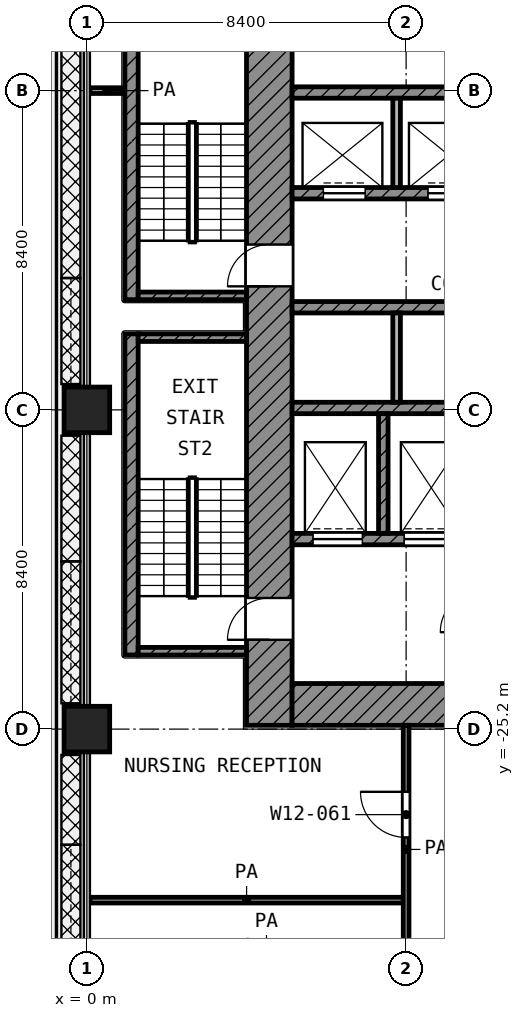
"""IFC4 building model, lengths in metres.
Left out: names, types, materials, properties, quantities, classifications, styles, units other than length and angle.
Written with IfcOpenShell. Run it as: python <this file> out.ifc"""

import sys

from ifc_helpers import new_model, si_unit, direction, frame, frame_2d, origin, origin_2d, place, context, subcontext, project, spatial, rectangle, extrude, element, fill, save


model = new_model("IFC4")
c1 = context("Model", 3, precision=1e-05, world=origin(), true_north=direction((0.0, 1.0)))
c2 = subcontext(c1, "Body", "Model", "MODEL_VIEW")
j1 = project(units=[si_unit("LENGTHUNIT", "METRE"), si_unit("PLANEANGLEUNIT", "RADIAN")], contexts=[c1])
p1 = place(None, origin())
s1 = spatial("IfcSite", under=j1, at=p1, CompositionType="ELEMENT")
p2 = place(p1, origin())
s2 = spatial("IfcBuilding", under=s1, at=p2, CompositionType="ELEMENT")
p3 = place(p2, frame((0.0, 0.0, 56.0)))
s3 = spatial("IfcBuildingStorey", under=s2, at=p3, CompositionType="ELEMENT", Elevation=56.0)
for number, where, z_axis, x_axis in (
    (1, (0.0, -16.8, 0.0), (0.0, 0.0, 1.0), (1.0, 0.0, 0.0)),
    (2, (0.0, -25.2, 0.0), (0.0, 0.0, 1.0), (1.0, 0.0, 0.0)),
):
    element("IfcColumn", number, at=place(p3, frame(where, z_axis=z_axis, x_axis=x_axis)), inside=s3, PredefinedType="COLUMN", context=c2, shape_type="SweptSolid", body=[
        extrude(rectangle(XDim=1.2, YDim=1.2, at=origin_2d()), origin(), (0.0, 0.0, 1.0), 4.2),
    ])
p4 = place(p3, frame((4.8, -25.1, 0.0), z_axis=(0.0, 0.0, 1.0), x_axis=(0.0, 1.0, 0.0)))
e3 = element("IfcWall", 3, at=p4, inside=s3, PredefinedType="SHEAR", context=c2, shape_type="SweptSolid", body=[
    extrude(rectangle(XDim=19.7, YDim=1.2, at=frame_2d((9.85, 0.0))), origin(), (0.0, 0.0, 1.0), 3.9),
])
p5 = place(p4, frame((11.55, 0.0, 0.0)))
e4 = element("IfcOpeningElement", 4, at=p5, cuts=e3, PredefinedType="OPENING", context=c2, shape_type="SweptSolid", body=[
    extrude(rectangle(XDim=1.1, YDim=2.1, at=frame_2d((0.55, 1.05))), frame((0.0, 0.61, 0.0), z_axis=(0.0, -1.0, 0.0), x_axis=(1.0, 0.0, 0.0)), (0.0, 0.0, 1.0), 1.22),
])
p6 = place(p4, frame((2.25, 0.0, 0.0)))
e5 = element("IfcOpeningElement", 5, at=p6, cuts=e3, PredefinedType="OPENING", context=c2, shape_type="SweptSolid", body=[
    extrude(rectangle(XDim=1.1, YDim=2.1, at=frame_2d((0.55, 1.05))), frame((0.0, 0.61, 0.0), z_axis=(0.0, -1.0, 0.0), x_axis=(1.0, 0.0, 0.0)), (0.0, 0.0, 1.0), 1.22),
])
p7 = place(p3, frame((5.4, -24.55, 0.0), z_axis=(0.0, 0.0, 1.0), x_axis=(1.0, 0.0, 0.0)))
e6 = element("IfcWall", 6, at=p7, inside=s3, PredefinedType="SHEAR", context=c2, shape_type="SweptSolid", body=[
    extrude(rectangle(XDim=18.6, YDim=1.1, at=frame_2d((9.3, 0.0))), origin(), (0.0, 0.0, 1.0), 3.9),
])
p8 = place(p7, frame((6.3, 0.0, 0.0)))
e7 = element("IfcOpeningElement", 7, at=p8, cuts=e6, PredefinedType="OPENING", context=c2, shape_type="SweptSolid", body=[
    extrude(rectangle(XDim=1.8, YDim=2.1, at=frame_2d((0.9, 1.05))), frame((0.0, 0.56, 0.0), z_axis=(0.0, -1.0, 0.0), x_axis=(1.0, 0.0, 0.0)), (0.0, 0.0, 1.0), 1.12),
])
p9 = place(p3, frame((5.4, -8.45, 0.0), z_axis=(0.0, 0.0, 1.0), x_axis=(1.0, 0.0, 0.0)))
e8 = element("IfcWall", 8, at=p9, inside=s3, PredefinedType="SHEAR", context=c2, shape_type="SweptSolid", body=[
    extrude(rectangle(XDim=16.65, YDim=0.3, at=frame_2d((8.325, 0.0))), origin(), (0.0, 0.0, 1.0), 3.9),
])
p10 = place(p3, frame((5.4, -11.1, 0.0), z_axis=(0.0, 0.0, 1.0), x_axis=(1.0, 0.0, 0.0)))
e9 = element("IfcWall", 9, at=p10, inside=s3, PredefinedType="SHEAR", context=c2, shape_type="SweptSolid", body=[
    extrude(rectangle(XDim=16.65, YDim=0.3, at=frame_2d((8.325, 0.0))), origin(), (0.0, 0.0, 1.0), 3.9),
])
p11 = place(p10, frame((0.825, 0.0, 0.0)))
e10 = element("IfcOpeningElement", 10, at=p11, cuts=e9, PredefinedType="OPENING", context=c2, shape_type="SweptSolid", body=[
    extrude(rectangle(XDim=1.1, YDim=2.1, at=frame_2d((0.55, 1.05))), frame((0.0, 0.16, 0.0), z_axis=(0.0, -1.0, 0.0), x_axis=(1.0, 0.0, 0.0)), (0.0, 0.0, 1.0), 0.32),
])
p12 = place(p10, frame((3.575, 0.0, 0.0)))
e11 = element("IfcOpeningElement", 11, at=p12, cuts=e9, PredefinedType="OPENING", context=c2, shape_type="SweptSolid", body=[
    extrude(rectangle(XDim=1.1, YDim=2.1, at=frame_2d((0.55, 1.05))), frame((0.0, 0.16, 0.0), z_axis=(0.0, -1.0, 0.0), x_axis=(1.0, 0.0, 0.0)), (0.0, 0.0, 1.0), 0.32),
])
p13 = place(p10, frame((6.325, 0.0, 0.0)))
e12 = element("IfcOpeningElement", 12, at=p13, cuts=e9, PredefinedType="OPENING", context=c2, shape_type="SweptSolid", body=[
    extrude(rectangle(XDim=1.1, YDim=2.1, at=frame_2d((0.55, 1.05))), frame((0.0, 0.16, 0.0), z_axis=(0.0, -1.0, 0.0), x_axis=(1.0, 0.0, 0.0)), (0.0, 0.0, 1.0), 0.32),
])
p14 = place(p10, frame((9.075, 0.0, 0.0)))
e13 = element("IfcOpeningElement", 13, at=p14, cuts=e9, PredefinedType="OPENING", context=c2, shape_type="SweptSolid", body=[
    extrude(rectangle(XDim=1.1, YDim=2.1, at=frame_2d((0.55, 1.05))), frame((0.0, 0.16, 0.0), z_axis=(0.0, -1.0, 0.0), x_axis=(1.0, 0.0, 0.0)), (0.0, 0.0, 1.0), 0.32),
])
for number, where, z_axis, x_axis in (
    (14, (5.4, -14.1, 0.0), (0.0, 0.0, 1.0), (1.0, 0.0, 0.0)),
    (15, (5.4, -16.75, 0.0), (0.0, 0.0, 1.0), (1.0, 0.0, 0.0)),
):
    element("IfcWall", number, at=place(p3, frame(where, z_axis=z_axis, x_axis=x_axis)), inside=s3, PredefinedType="SHEAR", context=c2, shape_type="SweptSolid", body=[
        extrude(rectangle(XDim=16.65, YDim=0.3, at=frame_2d((8.325, 0.0))), origin(), (0.0, 0.0, 1.0), 3.9),
    ])
p15 = place(p3, frame((5.4, -20.2, 0.0), z_axis=(0.0, 0.0, 1.0), x_axis=(1.0, 0.0, 0.0)))
e16 = element("IfcWall", 16, at=p15, inside=s3, PredefinedType="SHEAR", context=c2, shape_type="SweptSolid", body=[
    extrude(rectangle(XDim=14.65, YDim=0.3, at=frame_2d((7.325, 0.0))), origin(), (0.0, 0.0, 1.0), 3.9),
])
p16 = place(p15, frame((10.55, 0.0, 0.0)))
e17 = element("IfcOpeningElement", 17, at=p16, cuts=e16, PredefinedType="OPENING", context=c2, shape_type="SweptSolid", body=[
    extrude(rectangle(XDim=1.3, YDim=2.1, at=frame_2d((0.65, 1.05))), frame((0.0, 0.16, 0.0), z_axis=(0.0, -1.0, 0.0), x_axis=(1.0, 0.0, 0.0)), (0.0, 0.0, 1.0), 0.32),
])
p17 = place(p15, frame((12.95, 0.0, 0.0)))
e18 = element("IfcOpeningElement", 18, at=p17, cuts=e16, PredefinedType="OPENING", context=c2, shape_type="SweptSolid", body=[
    extrude(rectangle(XDim=1.3, YDim=2.1, at=frame_2d((0.65, 1.05))), frame((0.0, 0.16, 0.0), z_axis=(0.0, -1.0, 0.0), x_axis=(1.0, 0.0, 0.0)), (0.0, 0.0, 1.0), 0.32),
])
p18 = place(p15, frame((0.55, 0.0, 0.0)))
e19 = element("IfcOpeningElement", 19, at=p18, cuts=e16, PredefinedType="OPENING", context=c2, shape_type="SweptSolid", body=[
    extrude(rectangle(XDim=1.3, YDim=2.1, at=frame_2d((0.65, 1.05))), frame((0.0, 0.16, 0.0), z_axis=(0.0, -1.0, 0.0), x_axis=(1.0, 0.0, 0.0)), (0.0, 0.0, 1.0), 0.32),
])
p19 = place(p15, frame((2.95, 0.0, 0.0)))
e20 = element("IfcOpeningElement", 20, at=p19, cuts=e16, PredefinedType="OPENING", context=c2, shape_type="SweptSolid", body=[
    extrude(rectangle(XDim=1.3, YDim=2.1, at=frame_2d((0.65, 1.05))), frame((0.0, 0.16, 0.0), z_axis=(0.0, -1.0, 0.0), x_axis=(1.0, 0.0, 0.0)), (0.0, 0.0, 1.0), 0.32),
])
p20 = place(p15, frame((7.15, 0.0, 0.0)))
e21 = element("IfcOpeningElement", 21, at=p20, cuts=e16, PredefinedType="OPENING", context=c2, shape_type="SweptSolid", body=[
    extrude(rectangle(XDim=0.9, YDim=2.1, at=frame_2d((0.45, 1.05))), frame((0.0, 0.16, 0.0), z_axis=(0.0, -1.0, 0.0), x_axis=(1.0, 0.0, 0.0)), (0.0, 0.0, 1.0), 0.32),
])
p21 = place(p3, frame((7.8, -20.05, 0.0), z_axis=(0.0, 0.0, 1.0), x_axis=(0.0, 1.0, 0.0)))
e22 = element("IfcWall", 22, at=p21, inside=s3, PredefinedType="SHEAR", context=c2, shape_type="SweptSolid", body=[
    extrude(rectangle(XDim=3.15, YDim=0.25, at=frame_2d((1.575, 0.0))), origin(), (0.0, 0.0, 1.0), 3.9),
])
p22 = place(p3, frame((8.15, -10.95, 0.0), z_axis=(0.0, 0.0, 1.0), x_axis=(0.0, 1.0, 0.0)))
e23 = element("IfcWall", 23, at=p22, inside=s3, PredefinedType="PARTITIONING", context=c2, shape_type="SweptSolid", body=[
    extrude(rectangle(XDim=2.35, YDim=0.2, at=frame_2d((1.175, 0.0))), origin(), (0.0, 0.0, 1.0), 3.9),
])
p23 = place(p3, frame((8.15, -16.6, 0.0), z_axis=(0.0, 0.0, 1.0), x_axis=(0.0, 1.0, 0.0)))
e24 = element("IfcWall", 24, at=p23, inside=s3, PredefinedType="PARTITIONING", context=c2, shape_type="SweptSolid", body=[
    extrude(rectangle(XDim=2.35, YDim=0.2, at=frame_2d((1.175, 0.0))), origin(), (0.0, 0.0, 1.0), 3.9),
])
p24 = place(p3, frame((1.175, -13.9, 0.0), z_axis=(0.0, 0.0, 1.0), x_axis=(0.0, 1.0, 0.0)))
e25 = element("IfcWall", 25, at=p24, inside=s3, PredefinedType="SHEAR", context=c2, shape_type="SweptSolid", body=[
    extrude(rectangle(XDim=8.45, YDim=0.35, at=frame_2d((4.225, 0.0))), origin(), (0.0, 0.0, 1.0), 3.9),
])
p25 = place(p3, frame((1.35, -13.8, 0.0), z_axis=(0.0, 0.0, 1.0), x_axis=(1.0, 0.0, 0.0)))
e26 = element("IfcWall", 26, at=p25, inside=s3, PredefinedType="SHEAR", context=c2, shape_type="SweptSolid", body=[
    extrude(rectangle(XDim=2.85, YDim=0.2, at=frame_2d((1.425, 0.0))), origin(), (0.0, 0.0, 1.0), 3.9),
])
p26 = place(p3, frame((1.175, -23.25, 0.0), z_axis=(0.0, 0.0, 1.0), x_axis=(0.0, 1.0, 0.0)))
e27 = element("IfcWall", 27, at=p26, inside=s3, PredefinedType="SHEAR", context=c2, shape_type="SweptSolid", body=[
    extrude(rectangle(XDim=8.45, YDim=0.35, at=frame_2d((4.225, 0.0))), origin(), (0.0, 0.0, 1.0), 3.9),
])
for number, where, z_axis, x_axis in (
    (28, (1.35, -14.9, 0.0), (0.0, 0.0, 1.0), (1.0, 0.0, 0.0)),
    (29, (1.35, -23.15, 0.0), (0.0, 0.0, 1.0), (1.0, 0.0, 0.0)),
):
    element("IfcWall", number, at=place(p3, frame(where, z_axis=z_axis, x_axis=x_axis)), inside=s3, PredefinedType="SHEAR", context=c2, shape_type="SweptSolid", body=[
        extrude(rectangle(XDim=2.85, YDim=0.2, at=frame_2d((1.425, 0.0))), origin(), (0.0, 0.0, 1.0), 3.9),
    ])
p27 = place(p3, frame((0.08, -29.7, 0.0), z_axis=(0.0, 0.0, 1.0), x_axis=(1.0, 0.0, 0.0)))
e30 = element("IfcWall", 30, at=p27, inside=s3, PredefinedType="PARTITIONING", context=c2, shape_type="SweptSolid", body=[
    extrude(rectangle(XDim=8.245, YDim=0.15, at=frame_2d((4.123, 0.0))), origin(), (0.0, 0.0, 1.0), 3.9),
])
p28 = place(p3, frame((0.08, -8.4, 0.0), z_axis=(0.0, 0.0, 1.0), x_axis=(1.0, 0.0, 0.0)))
e31 = element("IfcWall", 31, at=p28, inside=s3, PredefinedType="PARTITIONING", context=c2, shape_type="SweptSolid", body=[
    extrude(rectangle(XDim=0.89, YDim=0.15, at=frame_2d((0.445, 0.0))), origin(), (0.0, 0.0, 1.0), 3.9),
])
p29 = place(p3, frame((8.4, -31.632, 0.0), z_axis=(0.0, 0.0, 1.0), x_axis=(0.0, 1.0, 0.0)))
e32 = element("IfcWall", 32, at=p29, inside=s3, PredefinedType="PARTITIONING", context=c2, shape_type="SweptSolid", body=[
    extrude(rectangle(XDim=6.532, YDim=0.15, at=frame_2d((3.266, 0.0))), origin(), (0.0, 0.0, 1.0), 3.9),
])
p30 = place(p29, frame((3.582, 0.0, 0.0)))
e33 = element("IfcOpeningElement", 33, at=p30, cuts=e32, PredefinedType="OPENING", context=c2, shape_type="SweptSolid", body=[
    extrude(rectangle(XDim=1.2, YDim=2.1, at=frame_2d((0.6, 1.05))), frame((0.0, 0.085, 0.0), z_axis=(0.0, -1.0, 0.0), x_axis=(1.0, 0.0, 0.0)), (0.0, 0.0, 1.0), 0.17),
])
p31 = place(p11, origin())
e34 = element("IfcDoor", 34, at=p31, inside=s3, OperationType="DOUBLE_DOOR_SLIDING", PredefinedType="DOOR", context=c2, shape_type="SweptSolid", body=[
    extrude(rectangle(XDim=1.1, YDim=2.1, at=frame_2d((0.55, 1.05))), frame((0.0, 0.025, 0.0), z_axis=(0.0, -1.0, 0.0), x_axis=(1.0, 0.0, 0.0)), (0.0, 0.0, 1.0), 0.05),
])
fill(e10, e34)
p32 = place(p12, origin())
e35 = element("IfcDoor", 35, at=p32, inside=s3, OperationType="DOUBLE_DOOR_SLIDING", PredefinedType="DOOR", context=c2, shape_type="SweptSolid", body=[
    extrude(rectangle(XDim=1.1, YDim=2.1, at=frame_2d((0.55, 1.05))), frame((0.0, 0.025, 0.0), z_axis=(0.0, -1.0, 0.0), x_axis=(1.0, 0.0, 0.0)), (0.0, 0.0, 1.0), 0.05),
])
fill(e11, e35)
p33 = place(p18, origin())
e36 = element("IfcDoor", 36, at=p33, inside=s3, OperationType="DOUBLE_DOOR_SLIDING", PredefinedType="DOOR", context=c2, shape_type="SweptSolid", body=[
    extrude(rectangle(XDim=1.3, YDim=2.1, at=frame_2d((0.65, 1.05))), frame((0.0, 0.025, 0.0), z_axis=(0.0, -1.0, 0.0), x_axis=(1.0, 0.0, 0.0)), (0.0, 0.0, 1.0), 0.05),
])
fill(e19, e36)
p34 = place(p19, origin())
e37 = element("IfcDoor", 37, at=p34, inside=s3, OperationType="DOUBLE_DOOR_SLIDING", PredefinedType="DOOR", context=c2, shape_type="SweptSolid", body=[
    extrude(rectangle(XDim=1.3, YDim=2.1, at=frame_2d((0.65, 1.05))), frame((0.0, 0.025, 0.0), z_axis=(0.0, -1.0, 0.0), x_axis=(1.0, 0.0, 0.0)), (0.0, 0.0, 1.0), 0.05),
])
fill(e20, e37)
p35 = place(p5, origin())
e38 = element("IfcDoor", 38, at=p35, inside=s3, OperationType="SINGLE_SWING_LEFT", PredefinedType="DOOR", context=c2, shape_type="SweptSolid", body=[
    extrude(rectangle(XDim=1.1, YDim=2.1, at=frame_2d((0.55, 1.05))), frame((0.0, 0.025, 0.0), z_axis=(0.0, -1.0, 0.0), x_axis=(1.0, 0.0, 0.0)), (0.0, 0.0, 1.0), 0.05),
])
fill(e4, e38)
p36 = place(p6, origin())
e39 = element("IfcDoor", 39, at=p36, inside=s3, OperationType="SINGLE_SWING_LEFT", PredefinedType="DOOR", context=c2, shape_type="SweptSolid", body=[
    extrude(rectangle(XDim=1.1, YDim=2.1, at=frame_2d((0.55, 1.05))), frame((0.0, 0.025, 0.0), z_axis=(0.0, -1.0, 0.0), x_axis=(1.0, 0.0, 0.0)), (0.0, 0.0, 1.0), 0.05),
])
fill(e5, e39)
p37 = place(p30, origin())
e40 = element("IfcDoor", 40, at=p37, inside=s3, OperationType="SINGLE_SWING_RIGHT", PredefinedType="DOOR", context=c2, shape_type="SweptSolid", body=[
    extrude(rectangle(XDim=1.2, YDim=2.1, at=frame_2d((0.6, 1.05))), frame((0.0, 0.025, 0.0), z_axis=(0.0, -1.0, 0.0), x_axis=(1.0, 0.0, 0.0)), (0.0, 0.0, 1.0), 0.05),
])
fill(e33, e40)
save(model, sys.argv[1])
